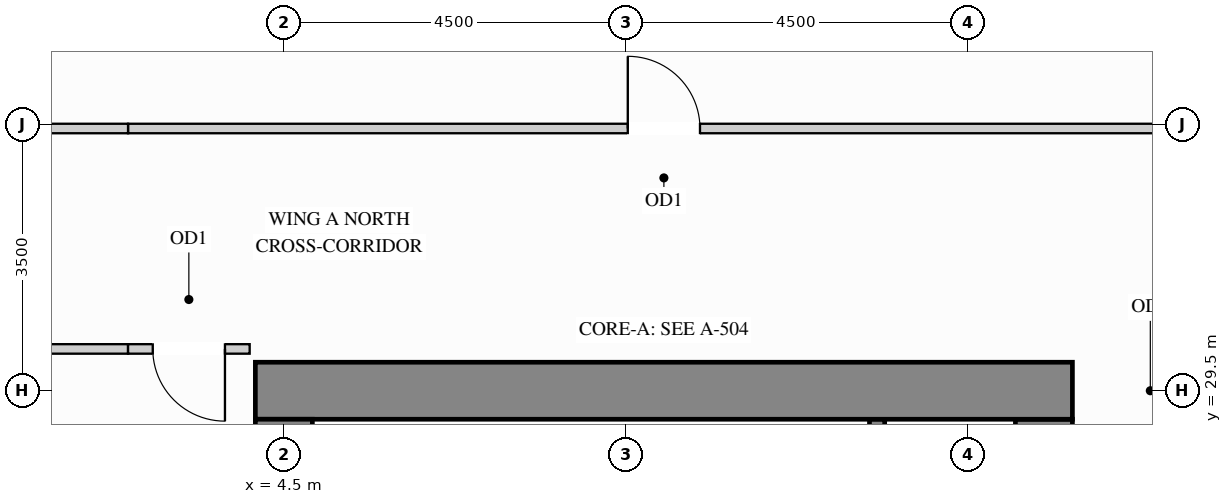
"""IFC4 building model, lengths in metres.
Left out: names, types, materials, properties, quantities, classifications, styles, units other than length and angle.
Written with IfcOpenShell. Run it as: python <this file> out.ifc"""

import sys

from ifc_helpers import new_model, si_unit, direction, frame, frame_2d, origin, place, context, subcontext, project, spatial, rectangle, extrude, source, transform, mapped, element, fill, save


model = new_model("IFC4")
c1 = context("Model", 3, precision=1e-05, world=origin(), true_north=direction((0.0, 1.0)))
c2 = subcontext(c1, "Body", "Model", "MODEL_VIEW")
j1 = project(units=[si_unit("LENGTHUNIT", "METRE"), si_unit("PLANEANGLEUNIT", "RADIAN")], contexts=[c1])
p1 = place(None, origin())
s1 = spatial("IfcSite", under=j1, at=p1, CompositionType="ELEMENT")
p2 = place(p1, origin())
s2 = spatial("IfcBuilding", under=s1, at=p2, CompositionType="ELEMENT")
p3 = place(p2, frame((0.0, 0.0, 99.0)))
s3 = spatial("IfcBuildingStorey", under=s2, at=p3, CompositionType="ELEMENT", Elevation=99.0)
m1 = source(origin(), c2, "Body", "SweptSolid", [
    extrude(rectangle(XDim=8.245, YDim=0.75, at=frame_2d((4.123, 0.0))), origin(), (0.0, 0.0, 1.0), 3.38),
])
p4 = place(p3, frame((14.5, 20.88, 0.0), z_axis=(0.0, 0.0, 1.0), x_axis=(0.0, 1.0, 0.0)))
e1 = element("IfcWall", 1, at=p4, inside=s3, PredefinedType="SHEAR", context=c2, shape_type="MappedRepresentation", body=[
    mapped(m1, transform((0.0, 0.0, 0.0), x_axis=(1.0, 0.0, 0.0), y_axis=(0.0, 1.0, 0.0), z_axis=(0.0, 0.0, 1.0))),
])
m2 = source(origin(), c2, "Body", "SweptSolid", [
    extrude(rectangle(XDim=10.75, YDim=0.75, at=frame_2d((5.375, 0.0))), origin(), (0.0, 0.0, 1.0), 3.38),
])
p5 = place(p3, frame((4.125, 29.5, 0.0), z_axis=(0.0, 0.0, 1.0), x_axis=(1.0, 0.0, 0.0)))
e2 = element("IfcWall", 2, at=p5, inside=s3, PredefinedType="SHEAR", context=c2, shape_type="MappedRepresentation", body=[
    mapped(m2, transform((0.0, 0.0, 0.0), x_axis=(1.0, 0.0, 0.0), y_axis=(0.0, 1.0, 0.0), z_axis=(0.0, 0.0, 1.0))),
])
m3 = source(origin(), c2, "Body", "SweptSolid", [
    extrude(rectangle(XDim=20.25, YDim=0.75, at=frame_2d((10.125, 0.0))), origin(), (0.0, 0.0, 1.0), 3.38),
])
p6 = place(p3, frame((4.5, 8.875, 0.0), z_axis=(0.0, 0.0, 1.0), x_axis=(0.0, 1.0, 0.0)))
e3 = element("IfcWall", 3, at=p6, inside=s3, PredefinedType="SHEAR", context=c2, shape_type="MappedRepresentation", body=[
    mapped(m3, transform((0.0, 0.0, 0.0), x_axis=(1.0, 0.0, 0.0), y_axis=(0.0, 1.0, 0.0), z_axis=(0.0, 0.0, 1.0))),
])
p7 = place(p3, frame((2.45, 32.95, 0.0), z_axis=(0.0, 0.0, 1.0), x_axis=(1.0, 0.0, 0.0)))
e4 = element("IfcWall", 4, at=p7, inside=s3, PredefinedType="PARTITIONING", context=c2, shape_type="SweptSolid", body=[
    extrude(rectangle(XDim=14.1, YDim=0.125, at=frame_2d((7.05, 0.0))), origin(), (0.0, 0.0, 1.0), 3.365),
])
p8 = place(p7, frame((6.575, 0.0, 0.0)))
e5 = element("IfcOpeningElement", 5, at=p8, cuts=e4, PredefinedType="OPENING", context=c2, shape_type="SweptSolid", body=[
    extrude(rectangle(XDim=0.95, YDim=2.15, at=frame_2d((0.475, 1.075))), frame((0.0, 0.073, 0.0), z_axis=(0.0, -1.0, 0.0), x_axis=(1.0, 0.0, 0.0)), (0.0, 0.0, 1.0), 0.145),
])
m4 = source(origin(), c2, "Body", "SweptSolid", [
    extrude(rectangle(XDim=2.098, YDim=0.125, at=frame_2d((1.049, 0.0))), origin(), (0.0, 0.0, 1.0), 3.365),
])
p9 = place(p3, frame((0.352, 32.95, 0.0), z_axis=(0.0, 0.0, 1.0), x_axis=(1.0, 0.0, 0.0)))
e6 = element("IfcWall", 6, at=p9, inside=s3, PredefinedType="PARTITIONING", context=c2, shape_type="MappedRepresentation", body=[
    mapped(m4, transform((0.0, 0.0, 0.0), x_axis=(1.0, 0.0, 0.0), y_axis=(0.0, 1.0, 0.0), z_axis=(0.0, 0.0, 1.0))),
])
m5 = source(origin(), c2, "Body", "SweptSolid", [
    extrude(rectangle(XDim=1.26, YDim=0.125, at=frame_2d((0.63, 0.0))), origin(), (0.0, 0.0, 1.0), 3.365),
])
p10 = place(p3, frame((1.19, 30.05, 0.0), z_axis=(0.0, 0.0, 1.0), x_axis=(1.0, 0.0, 0.0)))
e7 = element("IfcWall", 7, at=p10, inside=s3, PredefinedType="PARTITIONING", context=c2, shape_type="MappedRepresentation", body=[
    mapped(m5, transform((0.0, 0.0, 0.0), x_axis=(1.0, 0.0, 0.0), y_axis=(0.0, 1.0, 0.0), z_axis=(0.0, 0.0, 1.0))),
])
p11 = place(p3, frame((2.45, 30.05, 0.0), z_axis=(0.0, 0.0, 1.0), x_axis=(1.0, 0.0, 0.0)))
e8 = element("IfcWall", 8, at=p11, inside=s3, PredefinedType="PARTITIONING", context=c2, shape_type="SweptSolid", body=[
    extrude(rectangle(XDim=1.6, YDim=0.125, at=frame_2d((0.8, 0.0))), origin(), (0.0, 0.0, 1.0), 3.365),
])
p12 = place(p11, frame((0.325, 0.0, 0.0)))
e9 = element("IfcOpeningElement", 9, at=p12, cuts=e8, PredefinedType="OPENING", context=c2, shape_type="SweptSolid", body=[
    extrude(rectangle(XDim=0.95, YDim=2.15, at=frame_2d((0.475, 1.075))), frame((0.0, 0.073, 0.0), z_axis=(0.0, -1.0, 0.0), x_axis=(1.0, 0.0, 0.0)), (0.0, 0.0, 1.0), 0.145),
])
m6 = source(origin(), c2, "Body", "SweptSolid", [
    extrude(rectangle(XDim=3.678, YDim=0.2, at=frame_2d((1.839, 0.0))), origin(), (0.0, 0.0, 1.0), 3.38),
])
p13 = place(p3, frame((12.305, 25.445, 0.0), z_axis=(0.0, 0.0, 1.0), x_axis=(0.0, 1.0, 0.0)))
e10 = element("IfcWall", 10, at=p13, inside=s3, PredefinedType="SHEAR", context=c2, shape_type="MappedRepresentation", body=[
    mapped(m6, transform((0.0, 0.0, 0.0), x_axis=(1.0, 0.0, 0.0), y_axis=(0.0, 1.0, 0.0), z_axis=(0.0, 0.0, 1.0))),
])
m7 = source(origin(), c2, "Body", "SweptSolid", [
    extrude(rectangle(XDim=0.95, YDim=2.15, at=frame_2d((0.475, 1.075))), frame((0.0, 0.025, 0.0), z_axis=(0.0, -1.0, 0.0), x_axis=(1.0, 0.0, 0.0)), (0.0, 0.0, 1.0), 0.05),
])
p14 = place(p8, origin())
e11 = element("IfcDoor", 11, at=p14, inside=s3, OperationType="SINGLE_SWING_LEFT", PredefinedType="DOOR", context=c2, shape_type="MappedRepresentation", body=[
    mapped(m7, transform((0.0, 0.0, 0.0), x_axis=(1.0, 0.0, 0.0), y_axis=(0.0, 1.0, 0.0), z_axis=(0.0, 0.0, 1.0))),
])
fill(e5, e11)
p15 = place(p12, origin())
e12 = element("IfcDoor", 12, at=p15, inside=s3, OperationType="SINGLE_SWING_RIGHT", PredefinedType="DOOR", context=c2, shape_type="MappedRepresentation", body=[
    mapped(m7, transform((0.0, 0.0, 0.0), x_axis=(1.0, 0.0, 0.0), y_axis=(0.0, 1.0, 0.0), z_axis=(0.0, 0.0, 1.0))),
])
fill(e9, e12)
save(model, sys.argv[1])
